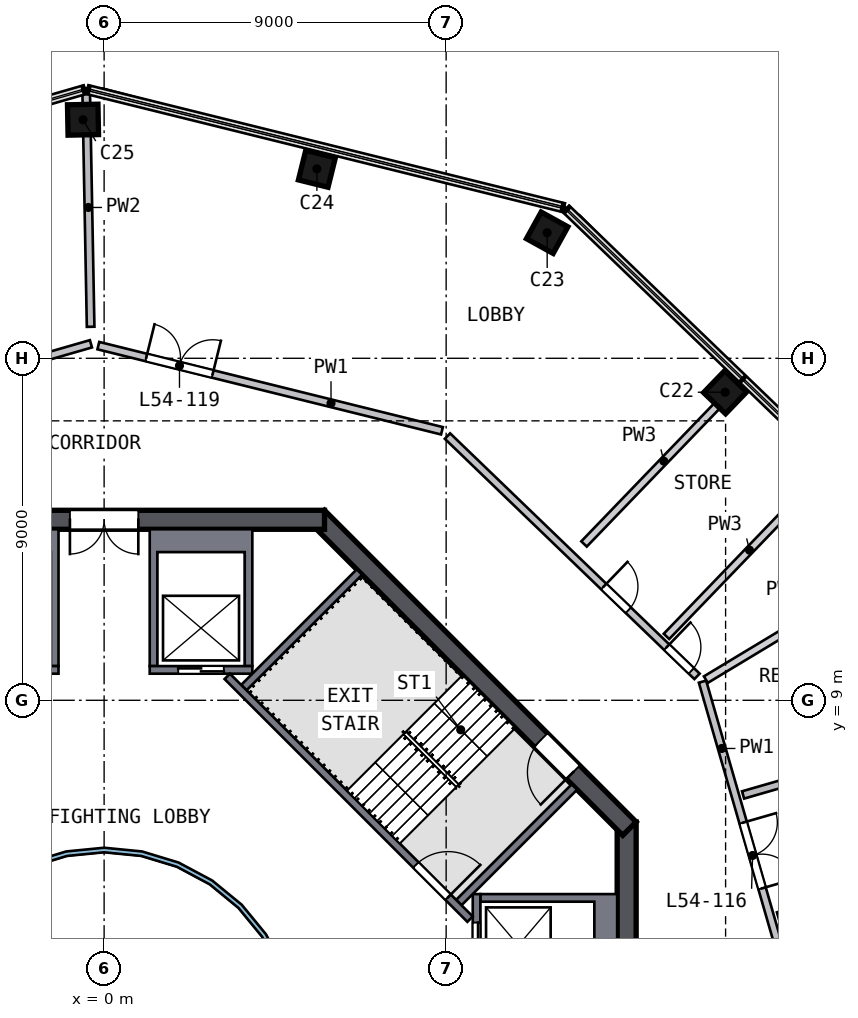
"""IFC4 building model, lengths in metres.
Left out: names, types, materials, properties, quantities, classifications, styles, units other than length and angle.
Written with IfcOpenShell. Run it as: python <this file> out.ifc"""

import sys

from ifc_helpers import new_model, si_unit, direction, frame, frame_2d, origin, origin_2d, place, context, subcontext, project, spatial, polyline, rectangle, outline, extrude, element, fill, save


model = new_model("IFC4")
c1 = context("Model", 3, precision=1e-05, world=origin(), true_north=direction((0.0, 1.0)))
c2 = subcontext(c1, "Body", "Model", "MODEL_VIEW")
j1 = project(units=[si_unit("LENGTHUNIT", "METRE"), si_unit("PLANEANGLEUNIT", "RADIAN")], contexts=[c1])
p1 = place(None, origin())
s1 = spatial("IfcSite", under=j1, at=p1, CompositionType="ELEMENT")
p2 = place(p1, origin())
s2 = spatial("IfcBuilding", under=s1, at=p2, CompositionType="ELEMENT")
p3 = place(p2, frame((0.0, 0.0, 222.0)))
s3 = spatial("IfcBuildingStorey", under=s2, at=p3, CompositionType="ELEMENT", Elevation=222.0)
p4 = place(p3, frame((16.411, 17.041, 0.0), z_axis=(-0.05739393, 0.054384122, 0.996869251), x_axis=(-0.717805399, 0.691739947, -0.079064874)))
e1 = element("IfcColumn", 1, at=p4, inside=s3, PredefinedType="COLUMN", context=c2, shape_type="SweptSolid", body=[
    extrude(rectangle(XDim=0.8, YDim=0.8, at=origin_2d()), origin(), (0.0, 0.0, 1.0), 4.705),
])
p5 = place(p3, frame((11.744, 21.257, 0.0), z_axis=(-0.071341292, 0.038654009, 0.996702708), x_axis=(0.872301895, -0.482188923, 0.081137213)))
e2 = element("IfcColumn", 2, at=p5, inside=s3, PredefinedType="COLUMN", context=c2, shape_type="SweptSolid", body=[
    extrude(rectangle(XDim=0.8, YDim=0.8, at=origin_2d()), origin(), (0.0, 0.0, 1.0), 4.706),
])
p6 = place(p3, frame((5.691, 22.963, 0.0), z_axis=(-0.07685412, 0.018422156, 0.996872142), x_axis=(-0.96741801, 0.240534622, -0.079028416)))
e3 = element("IfcColumn", 3, at=p6, inside=s3, PredefinedType="COLUMN", context=c2, shape_type="SweptSolid", body=[
    extrude(rectangle(XDim=0.8, YDim=0.8, at=origin_2d()), origin(), (0.0, 0.0, 1.0), 4.705),
])
p7 = place(p3, frame((-0.458, 24.281, 0.0), z_axis=(-0.081095683, -0.002231039, 0.996703824), x_axis=(0.996522811, 0.019006948, 0.081123501)))
e4 = element("IfcColumn", 4, at=p7, inside=s3, PredefinedType="COLUMN", context=c2, shape_type="SweptSolid", body=[
    extrude(rectangle(XDim=0.8, YDim=0.8, at=origin_2d()), origin(), (0.0, 0.0, 1.0), 4.706),
])
p8 = place(p3, frame((13.75, -5.799, 0.0), z_axis=(0.0, 0.0, 1.0), x_axis=(0.0, 1.0, 0.0)))
e5 = element("IfcWall", 5, at=p8, inside=s3, PredefinedType="SHEAR", context=c2, shape_type="SweptSolid", body=[
    extrude(rectangle(XDim=11.598, YDim=0.5, at=frame_2d((5.799, 0.0))), origin(), (0.0, 0.0, 1.0), 5.0),
])
p9 = place(p8, frame((4.899, 0.0, 0.0)))
e6 = element("IfcOpeningElement", 6, at=p9, cuts=e5, PredefinedType="OPENING", context=c2, shape_type="SweptSolid", body=[
    extrude(rectangle(XDim=1.8, YDim=2.1, at=frame_2d((0.9, 1.05))), frame((0.0, 0.26, 0.0), z_axis=(0.0, -1.0, 0.0), x_axis=(1.0, 0.0, 0.0)), (0.0, 0.0, 1.0), 0.52),
])
p10 = place(p3, frame((13.823, 5.622, 0.0), z_axis=(0.0, 0.0, 1.0), x_axis=(-0.707106781, 0.707106781, 0.0)))
e7 = element("IfcWall", 7, at=p10, inside=s3, PredefinedType="SHEAR", context=c2, shape_type="SweptSolid", body=[
    extrude(rectangle(XDim=11.598, YDim=0.5, at=frame_2d((5.799, 0.0))), origin(), (0.0, 0.0, 1.0), 5.0),
])
p11 = place(p10, frame((2.099, 0.0, 0.0)))
e8 = element("IfcOpeningElement", 8, at=p11, cuts=e7, PredefinedType="OPENING", context=c2, shape_type="SweptSolid", body=[
    extrude(rectangle(XDim=1.2, YDim=2.1, at=frame_2d((0.6, 1.05))), frame((0.0, 0.26, 0.0), z_axis=(0.0, -1.0, 0.0), x_axis=(1.0, 0.0, 0.0)), (0.0, 0.0, 1.0), 0.52),
])
p12 = place(p3, frame((5.799, 13.75, 0.0), z_axis=(0.0, 0.0, 1.0), x_axis=(-1.0, 0.0, 0.0)))
e9 = element("IfcWall", 9, at=p12, inside=s3, PredefinedType="SHEAR", context=c2, shape_type="SweptSolid", body=[
    extrude(rectangle(XDim=11.598, YDim=0.5, at=frame_2d((5.799, 0.0))), origin(), (0.0, 0.0, 1.0), 5.0),
])
p13 = place(p12, frame((4.899, 0.0, 0.0)))
e10 = element("IfcOpeningElement", 10, at=p13, cuts=e9, PredefinedType="OPENING", context=c2, shape_type="SweptSolid", body=[
    extrude(rectangle(XDim=1.8, YDim=2.1, at=frame_2d((0.9, 1.05))), frame((0.0, 0.26, 0.0), z_axis=(0.0, -1.0, 0.0), x_axis=(1.0, 0.0, 0.0)), (0.0, 0.0, 1.0), 0.52),
])
p14 = place(p3, origin())
e11 = element("IfcWall", 11, at=p14, inside=s3, PredefinedType="SOLIDWALL", context=c2, shape_type="SweptSolid", body=[
    extrude(outline(polyline([(13.5, 3.9), (13.5, 1.2), (9.9, 1.2), (9.9, 1.4), (12.9, 1.4), (12.9, 3.7), (9.9, 3.7), (9.9, 3.9), (13.5, 3.9)])), origin(), (0.0, 0.0, 1.0), 4.69),
])
p15 = place(p3, frame((9.8, 1.2, 0.0), z_axis=(0.0, 0.0, 1.0), x_axis=(0.0, 1.0, 0.0)))
e12 = element("IfcWall", 12, at=p15, inside=s3, PredefinedType="SOLIDWALL", context=c2, shape_type="SweptSolid", body=[
    extrude(rectangle(XDim=2.7, YDim=0.2, at=frame_2d((1.35, 0.0))), origin(), (0.0, 0.0, 1.0), 4.69),
])
p16 = place(p15, frame((0.75, 0.0, 0.0)))
e13 = element("IfcOpeningElement", 13, at=p16, cuts=e12, PredefinedType="OPENING", context=c2, shape_type="SweptSolid", body=[
    extrude(rectangle(XDim=1.2, YDim=2.1, at=frame_2d((0.6, 1.05))), frame((0.0, 0.11, 0.0), z_axis=(0.0, -1.0, 0.0), x_axis=(1.0, 0.0, 0.0)), (0.0, 0.0, 1.0), 0.22),
])
p17 = place(p3, origin())
e14 = element("IfcWall", 14, at=p17, inside=s3, PredefinedType="SOLIDWALL", context=c2, shape_type="SweptSolid", body=[
    extrude(outline(polyline([(3.9, 9.9), (3.7, 9.9), (3.7, 12.9), (1.4, 12.9), (1.4, 9.9), (1.2, 9.9), (1.2, 13.5), (3.9, 13.5), (3.9, 9.9)])), origin(), (0.0, 0.0, 1.0), 4.69),
])
p18 = place(p3, frame((1.2, 9.8, 0.0), z_axis=(0.0, 0.0, 1.0), x_axis=(1.0, 0.0, 0.0)))
e15 = element("IfcWall", 15, at=p18, inside=s3, PredefinedType="SOLIDWALL", context=c2, shape_type="SweptSolid", body=[
    extrude(rectangle(XDim=2.7, YDim=0.2, at=frame_2d((1.35, 0.0))), origin(), (0.0, 0.0, 1.0), 4.69),
])
p19 = place(p18, frame((0.75, 0.0, 0.0)))
e16 = element("IfcOpeningElement", 16, at=p19, cuts=e15, PredefinedType="OPENING", context=c2, shape_type="SweptSolid", body=[
    extrude(rectangle(XDim=1.2, YDim=2.1, at=frame_2d((0.6, 1.05))), frame((0.0, 0.11, 0.0), z_axis=(0.0, -1.0, 0.0), x_axis=(1.0, 0.0, 0.0)), (0.0, 0.0, 1.0), 0.22),
])
p20 = place(p3, origin())
e17 = element("IfcWall", 17, at=p20, inside=s3, PredefinedType="SOLIDWALL", context=c2, shape_type="SweptSolid", body=[
    extrude(outline(polyline([(-3.9, 13.5), (-1.2, 13.5), (-1.2, 9.9), (-1.4, 9.9), (-1.4, 12.9), (-3.7, 12.9), (-3.7, 9.9), (-3.9, 9.9), (-3.9, 13.5)])), origin(), (0.0, 0.0, 1.0), 4.69),
])
p21 = place(p3, frame((-1.2, 9.8, 0.0), z_axis=(0.0, 0.0, 1.0), x_axis=(-1.0, 0.0, 0.0)))
e18 = element("IfcWall", 18, at=p21, inside=s3, PredefinedType="SOLIDWALL", context=c2, shape_type="SweptSolid", body=[
    extrude(rectangle(XDim=2.7, YDim=0.2, at=frame_2d((1.35, 0.0))), origin(), (0.0, 0.0, 1.0), 4.69),
])
p22 = place(p21, frame((0.75, 0.0, 0.0)))
e19 = element("IfcOpeningElement", 19, at=p22, cuts=e18, PredefinedType="OPENING", context=c2, shape_type="SweptSolid", body=[
    extrude(rectangle(XDim=1.2, YDim=2.1, at=frame_2d((0.6, 1.05))), frame((0.0, 0.11, 0.0), z_axis=(0.0, -1.0, 0.0), x_axis=(1.0, 0.0, 0.0)), (0.0, 0.0, 1.0), 0.22),
])
p23 = place(p3, frame((3.24, 9.629, 0.0), z_axis=(0.0, 0.0, 1.0), x_axis=(0.707106781, -0.707106781, 0.0)))
e20 = element("IfcWall", 20, at=p23, inside=s3, PredefinedType="SOLIDWALL", context=c2, shape_type="SweptSolid", body=[
    extrude(rectangle(XDim=9.036, YDim=0.2, at=frame_2d((4.518, 0.0))), origin(), (0.0, 0.0, 1.0), 4.69),
])
p24 = place(p23, frame((7.018, 0.0, 0.0)))
e21 = element("IfcOpeningElement", 21, at=p24, cuts=e20, PredefinedType="OPENING", context=c2, shape_type="SweptSolid", body=[
    extrude(rectangle(XDim=1.2, YDim=2.1, at=frame_2d((0.6, 1.05))), frame((0.0, 0.11, 0.0), z_axis=(0.0, -1.0, 0.0), x_axis=(1.0, 0.0, 0.0)), (0.0, 0.0, 1.0), 0.22),
])
for number, where, z_axis, x_axis in (
    (22, (9.334, 3.677, 0.0), (0.0, 0.0, 1.0), (0.707, 0.707, 0.0)),
    (23, (3.677, 9.334, 0.0), (0.0, 0.0, 1.0), (0.707, 0.707, 0.0)),
):
    element("IfcWall", number, at=place(p3, frame(where, z_axis=z_axis, x_axis=x_axis)), inside=s3, PredefinedType="SOLIDWALL", context=c2, shape_type="SweptSolid", body=[
        extrude(rectangle(XDim=4.3, YDim=0.2, at=frame_2d((2.15, 0.0))), origin(), (0.0, 0.0, 1.0), 4.69),
    ])
p25 = place(p3, origin())
e24 = element("IfcWall", 24, at=p25, inside=s3, PredefinedType="SOLIDWALL", context=c2, shape_type="SweptSolid", body=[
    extrude(outline(polyline([(5.021, -0.999), (4.73, -1.959), (4.257, -2.844), (3.62, -3.62), (2.844, -4.257), (1.959, -4.73), (0.999, -5.021), (0.0, -5.12), (-0.999, -5.021), (-1.959, -4.73), (-2.844, -4.257), (-3.62, -3.62), (-4.257, -2.844), (-4.73, -1.959), (-5.021, -0.999), (-5.12, 0.0), (-5.021, 0.999), (-4.73, 1.959), (-4.257, 2.844), (-3.62, 3.62), (-2.844, 4.257), (-1.959, 4.73), (-0.999, 5.021), (0.0, 5.12), (0.999, 5.021), (1.959, 4.73), (2.844, 4.257), (3.62, 3.62), (4.257, 2.844), (4.73, 1.959), (5.021, 0.999), (5.12, 0.0), (5.021, -0.999)]), holes=[polyline([(4.904, 0.976), (4.619, 1.913), (4.157, 2.778), (3.535, 3.535), (2.778, 4.157), (1.913, 4.619), (0.976, 4.904), (0.0, 5.0), (-0.976, 4.904), (-1.913, 4.619), (-2.778, 4.157), (-3.535, 3.535), (-4.157, 2.778), (-4.619, 1.913), (-4.904, 0.976), (-5.0, 0.0), (-4.904, -0.976), (-4.619, -1.913), (-4.157, -2.778), (-3.535, -3.535), (-2.778, -4.157), (-1.913, -4.619), (-0.976, -4.904), (0.0, -5.0), (0.976, -4.904), (1.913, -4.619), (2.778, -4.157), (3.535, -3.535), (4.157, -2.778), (4.619, -1.913), (4.904, -0.976), (5.0, 0.0), (4.904, 0.976)])]), origin(), (0.0, 0.0, 1.0), 4.69),
])
p26 = place(p3, frame((-9.491, 15.746, 0.0), z_axis=(0.0, 0.0, 1.0), x_axis=(0.960871663, 0.276993948, 0.0)))
e25 = element("IfcWall", 25, at=p26, inside=s3, PredefinedType="SOLIDWALL", context=c2, shape_type="SweptSolid", body=[
    extrude(rectangle(XDim=9.516, YDim=0.2, at=frame_2d((4.758, 0.0))), origin(), (0.0, 0.0, 1.0), 4.69),
])
p27 = place(p26, frame((1.5, 0.0, 0.0)))
e26 = element("IfcOpeningElement", 26, at=p27, cuts=e25, PredefinedType="OPENING", context=c2, shape_type="SweptSolid", body=[
    extrude(rectangle(XDim=1.8, YDim=2.1, at=frame_2d((0.9, 1.05))), frame((0.0, 0.11, 0.0), z_axis=(0.0, -1.0, 0.0), x_axis=(1.0, 0.0, 0.0)), (0.0, 0.0, 1.0), 0.22),
])
p28 = place(p3, frame((-0.152, 18.333, 0.0), z_axis=(0.0, 0.0, 1.0), x_axis=(0.970630731, -0.240574278, 0.0)))
e27 = element("IfcWall", 27, at=p28, inside=s3, PredefinedType="SOLIDWALL", context=c2, shape_type="SweptSolid", body=[
    extrude(rectangle(XDim=9.316, YDim=0.2, at=frame_2d((4.658, 0.0))), origin(), (0.0, 0.0, 1.0), 4.69),
])
p29 = place(p28, frame((1.3, 0.0, 0.0)))
e28 = element("IfcOpeningElement", 28, at=p29, cuts=e27, PredefinedType="OPENING", context=c2, shape_type="SweptSolid", body=[
    extrude(rectangle(XDim=1.8, YDim=2.1, at=frame_2d((0.9, 1.05))), frame((0.0, 0.11, 0.0), z_axis=(0.0, -1.0, 0.0), x_axis=(1.0, 0.0, 0.0)), (0.0, 0.0, 1.0), 0.22),
])
p30 = place(p3, frame((9.035, 15.953, 0.0), z_axis=(0.0, 0.0, 1.0), x_axis=(0.720318231, -0.693643746, 0.0)))
e29 = element("IfcWall", 29, at=p30, inside=s3, PredefinedType="SOLIDWALL", context=c2, shape_type="SweptSolid", body=[
    extrude(rectangle(XDim=9.116, YDim=0.2, at=frame_2d((4.558, 0.0))), origin(), (0.0, 0.0, 1.0), 4.69),
])
p31 = place(p30, frame((8.008, 0.0, 0.0)))
e30 = element("IfcOpeningElement", 30, at=p31, cuts=e29, PredefinedType="OPENING", context=c2, shape_type="SweptSolid", body=[
    extrude(rectangle(XDim=0.9, YDim=2.1, at=frame_2d((0.45, 1.05))), frame((0.0, 0.11, 0.0), z_axis=(0.0, -1.0, 0.0), x_axis=(1.0, 0.0, 0.0)), (0.0, 0.0, 1.0), 0.22),
])
p32 = place(p30, frame((5.708, 0.0, 0.0)))
e31 = element("IfcOpeningElement", 31, at=p32, cuts=e29, PredefinedType="OPENING", context=c2, shape_type="SweptSolid", body=[
    extrude(rectangle(XDim=0.9, YDim=2.1, at=frame_2d((0.45, 1.05))), frame((0.0, 0.11, 0.0), z_axis=(0.0, -1.0, 0.0), x_axis=(1.0, 0.0, 0.0)), (0.0, 0.0, 1.0), 0.22),
])
p33 = place(p3, frame((15.746, 9.491, 0.0), z_axis=(0.0, 0.0, 1.0), x_axis=(0.276983861, -0.960874571, 0.0)))
e32 = element("IfcWall", 32, at=p33, inside=s3, PredefinedType="SOLIDWALL", context=c2, shape_type="SweptSolid", body=[
    extrude(rectangle(XDim=9.317, YDim=0.2, at=frame_2d((4.658, 0.0))), origin(), (0.0, 0.0, 1.0), 4.69),
])
p34 = place(p33, frame((3.861, 0.0, 0.0)))
e33 = element("IfcOpeningElement", 33, at=p34, cuts=e32, PredefinedType="OPENING", context=c2, shape_type="SweptSolid", body=[
    extrude(rectangle(XDim=1.8, YDim=2.1, at=frame_2d((0.9, 1.05))), frame((0.0, 0.11, 0.0), z_axis=(0.0, -1.0, 0.0), x_axis=(1.0, 0.0, 0.0)), (0.0, 0.0, 1.0), 0.22),
])
p35 = place(p3, frame((-0.355, 18.829, 0.0), z_axis=(0.0, 0.0, 1.0), x_axis=(-0.018848441, 0.999822352, 0.0)))
e34 = element("IfcWall", 34, at=p35, inside=s3, PredefinedType="SOLIDWALL", context=c2, shape_type="SweptSolid", body=[
    extrude(rectangle(XDim=6.282, YDim=0.2, at=frame_2d((3.141, 0.0))), origin(), (0.0, 0.0, 1.0), 4.69),
])
p36 = place(p3, frame((16.813, 6.509, 0.0), z_axis=(0.0, 0.0, 1.0), x_axis=(0.960873818, 0.276986474, 0.0)))
e35 = element("IfcWall", 35, at=p36, inside=s3, PredefinedType="SOLIDWALL", context=c2, shape_type="SweptSolid", body=[
    extrude(rectangle(XDim=11.198, YDim=0.2, at=frame_2d((5.599, 0.0))), origin(), (0.0, 0.0, 1.0), 4.69),
])
p37 = place(p36, frame((3.3, 0.0, 0.0)))
e36 = element("IfcOpeningElement", 36, at=p37, cuts=e35, PredefinedType="OPENING", context=c2, shape_type="SweptSolid", body=[
    extrude(rectangle(XDim=1.0, YDim=2.1, at=frame_2d((0.5, 1.05))), frame((0.0, 0.11, 0.0), z_axis=(0.0, -1.0, 0.0), x_axis=(1.0, 0.0, 0.0)), (0.0, 0.0, 1.0), 0.22),
])
p38 = place(p3, frame((28.492, 6.426, 0.0), z_axis=(0.0, 0.0, 1.0), x_axis=(-0.96087962, -0.276966345, 0.0)))
e37 = element("IfcWall", 37, at=p38, inside=s3, PredefinedType="SOLIDWALL", context=c2, shape_type="SweptSolid", body=[
    extrude(rectangle(XDim=11.198, YDim=0.2, at=frame_2d((5.599, 0.0))), origin(), (0.0, 0.0, 1.0), 4.69),
])
p39 = place(p38, frame((1.65, 0.0, 0.0)))
e38 = element("IfcOpeningElement", 38, at=p39, cuts=e37, PredefinedType="OPENING", context=c2, shape_type="SweptSolid", body=[
    extrude(rectangle(XDim=1.0, YDim=2.1, at=frame_2d((0.5, 1.05))), frame((0.0, 0.11, 0.0), z_axis=(0.0, -1.0, 0.0), x_axis=(1.0, 0.0, 0.0)), (0.0, 0.0, 1.0), 0.22),
])
p40 = place(p3, frame((16.827, 17.473, 0.0), z_axis=(0.0, 0.0, 1.0), x_axis=(-0.693670367, -0.720292594, 0.0)))
e39 = element("IfcWall", 39, at=p40, inside=s3, PredefinedType="SOLIDWALL", context=c2, shape_type="SweptSolid", body=[
    extrude(rectangle(XDim=6.052, YDim=0.2, at=frame_2d((3.026, 0.0))), origin(), (0.0, 0.0, 1.0), 4.69),
])
p41 = place(p3, frame((14.798, 10.681, 0.0), z_axis=(0.0, 0.0, 1.0), x_axis=(0.693669986, 0.720292962, 0.0)))
e40 = element("IfcWall", 40, at=p41, inside=s3, PredefinedType="SOLIDWALL", context=c2, shape_type="SweptSolid", body=[
    extrude(rectangle(XDim=6.3, YDim=0.2, at=frame_2d((3.15, 0.0))), origin(), (0.0, 0.0, 1.0), 4.69),
])
p42 = place(p3, frame((15.834, 9.544, 0.0), z_axis=(0.0, 0.0, 1.0), x_axis=(0.856447509, 0.516234118, 0.0)))
e41 = element("IfcWall", 41, at=p42, inside=s3, PredefinedType="SOLIDWALL", context=c2, shape_type="SweptSolid", body=[
    extrude(rectangle(XDim=6.626, YDim=0.2, at=frame_2d((3.313, 0.0))), origin(), (0.0, 0.0, 1.0), 4.19),
])
p43 = place(p16, origin())
e42 = element("IfcDoor", 42, at=p43, inside=s3, OperationType="DOUBLE_DOOR_SLIDING", PredefinedType="DOOR", context=c2, shape_type="SweptSolid", body=[
    extrude(rectangle(XDim=1.2, YDim=2.1, at=frame_2d((0.6, 1.05))), frame((0.0, 0.025, 0.0), z_axis=(0.0, -1.0, 0.0), x_axis=(1.0, 0.0, 0.0)), (0.0, 0.0, 1.0), 0.05),
])
fill(e13, e42)
p44 = place(p19, origin())
e43 = element("IfcDoor", 43, at=p44, inside=s3, OperationType="DOUBLE_DOOR_SLIDING", PredefinedType="DOOR", context=c2, shape_type="SweptSolid", body=[
    extrude(rectangle(XDim=1.2, YDim=2.1, at=frame_2d((0.6, 1.05))), frame((0.0, 0.025, 0.0), z_axis=(0.0, -1.0, 0.0), x_axis=(1.0, 0.0, 0.0)), (0.0, 0.0, 1.0), 0.05),
])
fill(e16, e43)
p45 = place(p24, origin())
e44 = element("IfcDoor", 44, at=p45, inside=s3, OperationType="SINGLE_SWING_RIGHT", PredefinedType="DOOR", context=c2, shape_type="SweptSolid", body=[
    extrude(rectangle(XDim=1.2, YDim=2.1, at=frame_2d((0.6, 1.05))), frame((0.0, 0.025, 0.0), z_axis=(0.0, -1.0, 0.0), x_axis=(1.0, 0.0, 0.0)), (0.0, 0.0, 1.0), 0.05),
])
fill(e21, e44)
p46 = place(p13, origin())
e45 = element("IfcDoor", 45, at=p46, inside=s3, OperationType="DOUBLE_DOOR_SINGLE_SWING", PredefinedType="DOOR", context=c2, shape_type="SweptSolid", body=[
    extrude(rectangle(XDim=1.8, YDim=2.1, at=frame_2d((0.9, 1.05))), frame((0.0, 0.025, 0.0), z_axis=(0.0, -1.0, 0.0), x_axis=(1.0, 0.0, 0.0)), (0.0, 0.0, 1.0), 0.05),
])
fill(e10, e45)
p47 = place(p11, origin())
e46 = element("IfcDoor", 46, at=p47, inside=s3, OperationType="SINGLE_SWING_LEFT", PredefinedType="DOOR", context=c2, shape_type="SweptSolid", body=[
    extrude(rectangle(XDim=1.2, YDim=2.1, at=frame_2d((0.6, 1.05))), frame((0.0, 0.025, 0.0), z_axis=(0.0, -1.0, 0.0), x_axis=(1.0, 0.0, 0.0)), (0.0, 0.0, 1.0), 0.05),
])
fill(e8, e46)
p48 = place(p34, origin())
e47 = element("IfcDoor", 47, at=p48, inside=s3, OperationType="DOUBLE_DOOR_SINGLE_SWING", PredefinedType="DOOR", context=c2, shape_type="SweptSolid", body=[
    extrude(rectangle(XDim=1.8, YDim=2.1, at=frame_2d((0.9, 1.05))), frame((0.0, 0.025, 0.0), z_axis=(0.0, -1.0, 0.0), x_axis=(1.0, 0.0, 0.0)), (0.0, 0.0, 1.0), 0.05),
])
fill(e33, e47)
p49 = place(p29, origin())
e48 = element("IfcDoor", 48, at=p49, inside=s3, OperationType="DOUBLE_DOOR_SINGLE_SWING", PredefinedType="DOOR", context=c2, shape_type="SweptSolid", body=[
    extrude(rectangle(XDim=1.8, YDim=2.1, at=frame_2d((0.9, 1.05))), frame((0.0, 0.025, 0.0), z_axis=(0.0, -1.0, 0.0), x_axis=(1.0, 0.0, 0.0)), (0.0, 0.0, 1.0), 0.05),
])
fill(e28, e48)
p50 = place(p31, origin())
e49 = element("IfcDoor", 49, at=p50, inside=s3, OperationType="SINGLE_SWING_LEFT", PredefinedType="DOOR", context=c2, shape_type="SweptSolid", body=[
    extrude(rectangle(XDim=0.9, YDim=2.1, at=frame_2d((0.45, 1.05))), frame((0.0, 0.025, 0.0), z_axis=(0.0, -1.0, 0.0), x_axis=(1.0, 0.0, 0.0)), (0.0, 0.0, 1.0), 0.05),
])
fill(e30, e49)
p51 = place(p32, origin())
e50 = element("IfcDoor", 50, at=p51, inside=s3, OperationType="SINGLE_SWING_LEFT", PredefinedType="DOOR", context=c2, shape_type="SweptSolid", body=[
    extrude(rectangle(XDim=0.9, YDim=2.1, at=frame_2d((0.45, 1.05))), frame((0.0, 0.025, 0.0), z_axis=(0.0, -1.0, 0.0), x_axis=(1.0, 0.0, 0.0)), (0.0, 0.0, 1.0), 0.05),
])
fill(e31, e50)
save(model, sys.argv[1])
